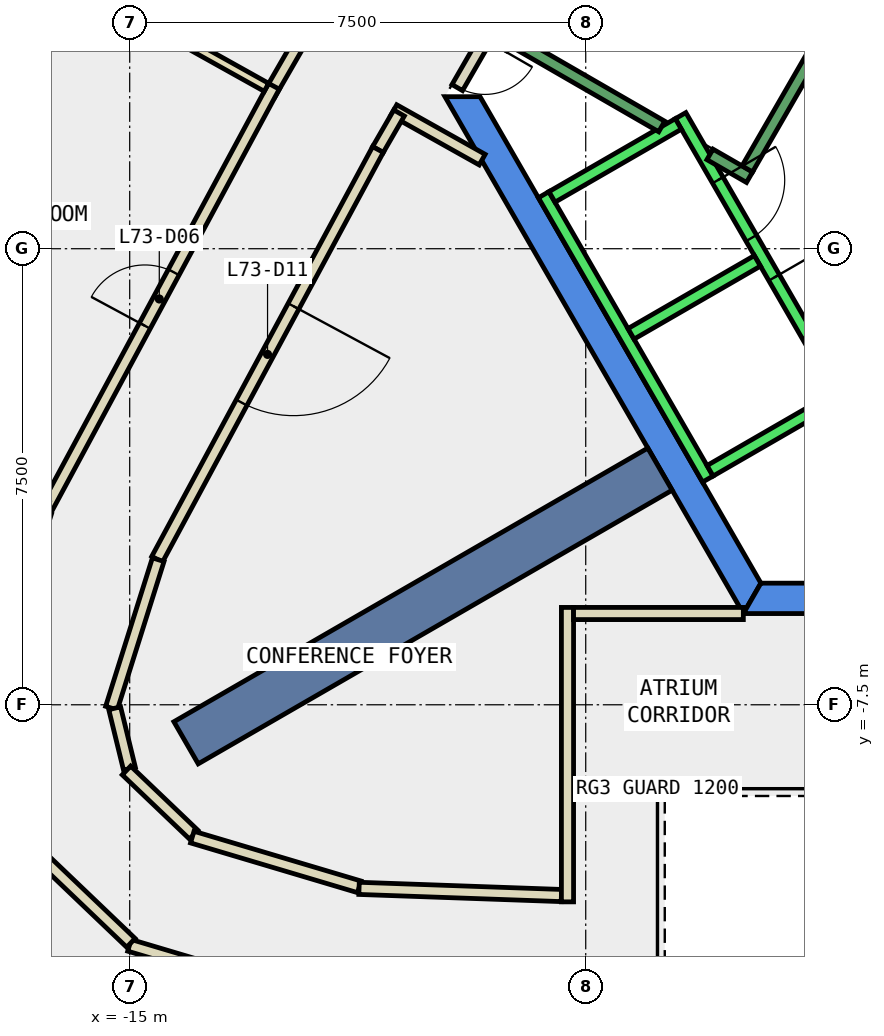
"""IFC4 building model, lengths in metres.
Left out: names, types, materials, properties, quantities, classifications, styles, units other than length and angle.
Written with IfcOpenShell. Run it as: python <this file> out.ifc"""

import sys

from ifc_helpers import new_model, si_unit, direction, frame, frame_2d, origin, place, context, subcontext, project, spatial, polyline, rectangle, outline, extrude, element, fill, save


model = new_model("IFC4")
c1 = context("Model", 3, precision=1e-05, world=origin(), true_north=direction((0.0, 1.0)))
c2 = subcontext(c1, "Body", "Model", "MODEL_VIEW")
j1 = project(units=[si_unit("LENGTHUNIT", "METRE"), si_unit("PLANEANGLEUNIT", "RADIAN")], contexts=[c1])
p1 = place(None, origin())
s1 = spatial("IfcSite", under=j1, at=p1, CompositionType="ELEMENT")
p2 = place(p1, origin())
s2 = spatial("IfcBuilding", under=s1, at=p2, CompositionType="ELEMENT")
p3 = place(p2, frame((0.0, 0.0, 311.6)))
s3 = spatial("IfcBuildingStorey", under=s2, at=p3, CompositionType="ELEMENT", Elevation=311.6)
p4 = place(p3, frame((0.0, 0.0, -0.34)))
e1 = element("IfcWall", 1, at=p4, inside=s3, PredefinedType="SHEAR", context=c2, shape_type="SweptSolid", body=[
    extrude(outline(polyline([(-9.815, 2.5), (-4.907, -6.0), (-4.619, -5.5), (-9.238, 2.5), (-9.815, 2.5)])), origin(), (0.0, 0.0, 1.0), 3.6),
])
p5 = place(p3, frame((0.0, 0.0, -0.34)))
e2 = element("IfcWall", 2, at=p5, inside=s3, PredefinedType="SHEAR", context=c2, shape_type="SweptSolid", body=[
    extrude(outline(polyline([(3.75, -6.0), (3.75, -5.5), (-4.619, -5.5), (-4.907, -6.0), (3.75, -6.0)])), origin(), (0.0, 0.0, 1.0), 3.6),
])
p6 = place(p3, frame((-6.279, -3.625, -0.34), z_axis=(0.0, 0.0, 1.0), x_axis=(-0.866017533419, -0.500013631625, 0.0)))
e3 = element("IfcWall", 3, at=p6, inside=s3, PredefinedType="SHEAR", context=c2, shape_type="SweptSolid", body=[
    extrude(rectangle(XDim=9.0, YDim=0.8, at=frame_2d((4.5, 0.0))), origin(), (0.0, 0.0, 1.0), 3.6),
])
p7 = place(p3, frame((-9.203, 1.465, 0.0), z_axis=(0.0, 0.0, 1.0), x_axis=(-0.872341127106, 0.488897696823, 0.0)))
e4 = element("IfcWall", 4, at=p7, inside=s3, PredefinedType="PARTITIONING", context=c2, shape_type="SweptSolid", body=[
    extrude(rectangle(XDim=1.667, YDim=0.2, at=frame_2d((0.833, 0.0))), origin(), (0.0, 0.0, 1.0), 3.26),
])
p8 = place(p3, frame((-10.57, 2.232, 0.0), z_axis=(0.0, 0.0, 1.0), x_axis=(-0.500037208726, -0.86600392025, 0.0)))
e5 = element("IfcWall", 5, at=p8, inside=s3, PredefinedType="PARTITIONING", context=c2, shape_type="SweptSolid", body=[
    extrude(rectangle(XDim=0.694, YDim=0.2, at=frame_2d((0.347, 0.0))), origin(), (0.0, 0.0, 1.0), 3.26),
])
p9 = place(p3, frame((-10.917, 1.631, 0.0), z_axis=(0.0, 0.0, 1.0), x_axis=(-0.47449538478, -0.880257990491, 0.0)))
e6 = element("IfcWall", 6, at=p9, inside=s3, PredefinedType="PARTITIONING", context=c2, shape_type="SweptSolid", body=[
    extrude(rectangle(XDim=7.655, YDim=0.2, at=frame_2d((3.827, 0.0))), origin(), (0.0, 0.0, 1.0), 3.26),
])
p10 = place(p9, frame((2.927, 0.0, 0.0)))
e7 = element("IfcOpeningElement", 7, at=p10, cuts=e6, PredefinedType="OPENING", context=c2, shape_type="SweptSolid", body=[
    extrude(rectangle(XDim=1.8, YDim=2.1, at=frame_2d((0.9, 1.05))), frame((0.0, 0.11, 0.0), z_axis=(0.0, -1.0, 0.0), x_axis=(1.0, 0.0, 0.0)), (0.0, 0.0, 1.0), 0.22),
])
p11 = place(p3, frame((-14.531, -5.114, 0.0), z_axis=(0.0, 0.0, 1.0), x_axis=(-0.300501248013, -0.953781421471, 0.0)))
e8 = element("IfcWall", 8, at=p11, inside=s3, PredefinedType="PARTITIONING", context=c2, shape_type="SweptSolid", body=[
    extrude(rectangle(XDim=2.559, YDim=0.2, at=frame_2d((1.28, 0.0))), origin(), (0.0, 0.0, 1.0), 3.26),
])
p12 = place(p3, frame((-15.247, -7.557, 0.0), z_axis=(0.0, 0.0, 1.0), x_axis=(0.237373129266, -0.971418549083, 0.0)))
e9 = element("IfcWall", 9, at=p12, inside=s3, PredefinedType="PARTITIONING", context=c2, shape_type="SweptSolid", body=[
    extrude(rectangle(XDim=1.024, YDim=0.2, at=frame_2d((0.512, 0.0))), origin(), (0.0, 0.0, 1.0), 3.26),
])
p13 = place(p3, frame((-15.053, -8.58, 0.0), z_axis=(0.0, 0.0, 1.0), x_axis=(0.723283043556, -0.690551691696, 0.0)))
e10 = element("IfcWall", 10, at=p13, inside=s3, PredefinedType="PARTITIONING", context=c2, shape_type="SweptSolid", body=[
    extrude(rectangle(XDim=1.529, YDim=0.2, at=frame_2d((0.765, 0.0))), origin(), (0.0, 0.0, 1.0), 3.26),
])
p14 = place(p3, frame((-13.971, -9.676, 0.0), z_axis=(0.0, 0.0, 1.0), x_axis=(0.958417413979, -0.285370041492, 0.0)))
e11 = element("IfcWall", 11, at=p14, inside=s3, PredefinedType="PARTITIONING", context=c2, shape_type="SweptSolid", body=[
    extrude(rectangle(XDim=2.866, YDim=0.2, at=frame_2d((1.433, 0.0))), origin(), (0.0, 0.0, 1.0), 3.26),
])
p15 = place(p3, frame((-11.228, -10.519, 0.0), z_axis=(0.0, 0.0, 1.0), x_axis=(0.999372900517, -0.035409119054, 0.0)))
e12 = element("IfcWall", 12, at=p15, inside=s3, PredefinedType="PARTITIONING", context=c2, shape_type="SweptSolid", body=[
    extrude(rectangle(XDim=3.33, YDim=0.2, at=frame_2d((1.665, 0.0))), origin(), (0.0, 0.0, 1.0), 3.26),
])
p16 = place(p3, frame((-12.701, 2.54, 0.0), z_axis=(0.0, 0.0, 1.0), x_axis=(0.499946799636, 0.86605611685, 0.0)))
e13 = element("IfcWall", 13, at=p16, inside=s3, PredefinedType="PARTITIONING", context=c2, shape_type="SweptSolid", body=[
    extrude(rectangle(XDim=8.227, YDim=0.2, at=frame_2d((4.114, 0.0))), origin(), (0.0, 0.0, 1.0), 3.26),
])
p17 = place(p16, frame((3.613, 0.0, 0.0)))
e14 = element("IfcOpeningElement", 14, at=p17, cuts=e13, PredefinedType="OPENING", context=c2, shape_type="SweptSolid", body=[
    extrude(rectangle(XDim=1.0, YDim=2.1, at=frame_2d((0.5, 1.05))), frame((0.0, 0.11, 0.0), z_axis=(0.0, -1.0, 0.0), x_axis=(1.0, 0.0, 0.0)), (0.0, 0.0, 1.0), 0.22),
])
p18 = place(p3, frame((-16.399, -4.325, 0.0), z_axis=(0.0, 0.0, 1.0), x_axis=(0.474489967676, 0.880260910512, 0.0)))
e15 = element("IfcWall", 15, at=p18, inside=s3, PredefinedType="PARTITIONING", context=c2, shape_type="SweptSolid", body=[
    extrude(rectangle(XDim=7.948, YDim=0.2, at=frame_2d((3.974, 0.0))), origin(), (0.0, 0.0, 1.0), 3.26),
])
p19 = place(p18, frame((3.474, 0.0, 0.0)))
e16 = element("IfcOpeningElement", 16, at=p19, cuts=e15, PredefinedType="OPENING", context=c2, shape_type="SweptSolid", body=[
    extrude(rectangle(XDim=1.0, YDim=2.1, at=frame_2d((0.5, 1.05))), frame((0.0, 0.11, 0.0), z_axis=(0.0, -1.0, 0.0), x_axis=(1.0, 0.0, 0.0)), (0.0, 0.0, 1.0), 0.22),
])
p20 = place(p3, frame((-11.55, -12.484, 0.0), z_axis=(0.0, 0.0, 1.0), x_axis=(-0.958459796003, 0.285227662485, 0.0)))
e17 = element("IfcWall", 17, at=p20, inside=s3, PredefinedType="PARTITIONING", context=c2, shape_type="SweptSolid", body=[
    extrude(rectangle(XDim=3.604, YDim=0.2, at=frame_2d((1.802, 0.0))), origin(), (0.0, 0.0, 1.0), 3.26),
])
p21 = place(p3, frame((-14.98, -11.415, 0.0), z_axis=(0.0, 0.0, 1.0), x_axis=(-0.723099256445, 0.690744138831, 0.0)))
e18 = element("IfcWall", 18, at=p21, inside=s3, PredefinedType="PARTITIONING", context=c2, shape_type="SweptSolid", body=[
    extrude(rectangle(XDim=2.596, YDim=0.2, at=frame_2d((1.298, 0.0))), origin(), (0.0, 0.0, 1.0), 3.26),
])
p22 = place(p3, frame((-7.8, -10.741, 0.0), z_axis=(0.0, 0.0, 1.0), x_axis=(0.0, 1.0, 0.0)))
e19 = element("IfcWall", 19, at=p22, inside=s3, PredefinedType="PARTITIONING", context=c2, shape_type="SweptSolid", body=[
    extrude(rectangle(XDim=4.842, YDim=0.2, at=frame_2d((2.421, 0.0))), origin(), (0.0, 0.0, 1.0), 3.26),
])
p23 = place(p3, frame((-7.7, -5.999, 0.0), z_axis=(0.0, 0.0, 1.0), x_axis=(1.0, 0.0, 0.0)))
e20 = element("IfcWall", 20, at=p23, inside=s3, PredefinedType="PARTITIONING", context=c2, shape_type="SweptSolid", body=[
    extrude(rectangle(XDim=2.792, YDim=0.2, at=frame_2d((1.396, 0.0))), origin(), (0.0, 0.0, 1.0), 3.26),
])
p24 = place(p3, frame((-12.751, 2.654, 0.0), z_axis=(0.0, 0.0, 1.0), x_axis=(-0.873277679945, 0.487222837837, 0.0)))
e21 = element("IfcWall", 21, at=p24, inside=s3, PredefinedType="PARTITIONING", context=c2, shape_type="SweptSolid", body=[
    extrude(rectangle(XDim=4.38, YDim=0.15, at=frame_2d((2.19, 0.0))), origin(), (0.0, 0.0, 1.0), 3.26),
])
p25 = place(p3, frame((-9.15, 3.452, 0.0), z_axis=(0.0, 0.0, 1.0), x_axis=(-0.500079945886, -0.865979242085, 0.0)))
e22 = element("IfcWall", 22, at=p25, inside=s3, PredefinedType="PARTITIONING", context=c2, shape_type="SweptSolid", body=[
    extrude(rectangle(XDim=0.926, YDim=0.2, at=frame_2d((0.463, 0.0))), origin(), (0.0, 0.0, 1.0), 2.4),
])
p26 = place(p25, frame((0.017, 0.0, 0.0)))
e23 = element("IfcOpeningElement", 23, at=p26, cuts=e22, PredefinedType="OPENING", context=c2, shape_type="SweptSolid", body=[
    extrude(rectangle(XDim=0.9, YDim=2.1, at=frame_2d((0.45, 1.05))), frame((0.0, 0.11, 0.0), z_axis=(0.0, -1.0, 0.0), x_axis=(1.0, 0.0, 0.0)), (0.0, 0.0, 1.0), 0.22),
])
p27 = place(p3, frame((-5.94, 2.188, 0.0), z_axis=(0.0, 0.0, 1.0), x_axis=(0.500034260056, -0.866005622828, 0.0)))
e24 = element("IfcWall", 24, at=p27, inside=s3, PredefinedType="STANDARD", context=c2, shape_type="SweptSolid", body=[
    extrude(rectangle(XDim=5.399, YDim=0.2, at=frame_2d((2.7, 0.0))), origin(), (0.0, 0.0, 1.0), 3.26),
])
p28 = place(p27, frame((3.075, 0.0, 0.0)))
e25 = element("IfcOpeningElement", 25, at=p28, cuts=e24, PredefinedType="OPENING", context=c2, shape_type="SweptSolid", body=[
    extrude(rectangle(XDim=1.1, YDim=2.1, at=frame_2d((0.55, 1.05))), frame((0.0, 0.11, 0.0), z_axis=(0.0, -1.0, 0.0), x_axis=(1.0, 0.0, 0.0)), (0.0, 0.0, 1.0), 0.22),
])
p29 = place(p27, frame((1.225, 0.0, 0.0)))
e26 = element("IfcOpeningElement", 26, at=p29, cuts=e24, PredefinedType="OPENING", context=c2, shape_type="SweptSolid", body=[
    extrude(rectangle(XDim=1.1, YDim=2.1, at=frame_2d((0.55, 1.05))), frame((0.0, 0.11, 0.0), z_axis=(0.0, -1.0, 0.0), x_axis=(1.0, 0.0, 0.0)), (0.0, 0.0, 1.0), 0.22),
])
p30 = place(p3, frame((-8.192, 0.888, 0.0), z_axis=(0.0, 0.0, 1.0), x_axis=(0.500034260056, -0.866005622828, 0.0)))
e27 = element("IfcWall", 27, at=p30, inside=s3, PredefinedType="STANDARD", context=c2, shape_type="SweptSolid", body=[
    extrude(rectangle(XDim=5.399, YDim=0.2, at=frame_2d((2.7, 0.0))), origin(), (0.0, 0.0, 1.0), 3.26),
])
for number, where, z_axis, x_axis in (
    (28, (-5.977, 2.052, 0.0), (0.0, 0.0, 1.0), (-0.866, -0.5, 0.0)),
    (29, (-4.677, -0.2, 0.0), (0.0, 0.0, 1.0), (-0.866, -0.5, 0.0)),
):
    element("IfcWall", number, at=place(p3, frame(where, z_axis=z_axis, x_axis=x_axis)), inside=s3, PredefinedType="STANDARD", context=c2, shape_type="SweptSolid", body=[
        extrude(rectangle(XDim=2.399, YDim=0.2, at=frame_2d((1.2, 0.0))), origin(), (0.0, 0.0, 1.0), 3.26),
    ])
p31 = place(p3, frame((-3.377, -2.452, 0.0), z_axis=(0.0, 0.0, 1.0), x_axis=(-0.865955154139, -0.50012165622, 0.0)))
e30 = element("IfcWall", 30, at=p31, inside=s3, PredefinedType="STANDARD", context=c2, shape_type="SweptSolid", body=[
    extrude(rectangle(XDim=2.4, YDim=0.2, at=frame_2d((1.2, 0.0))), origin(), (0.0, 0.0, 1.0), 3.26),
])
p32 = place(p3, frame((-6.25, 2.01, 0.0), z_axis=(0.0, 0.0, 1.0), x_axis=(-0.86611865017, 0.499838457731, 0.0)))
e31 = element("IfcWall", 31, at=p32, inside=s3, PredefinedType="STANDARD", context=c2, shape_type="SweptSolid", body=[
    extrude(rectangle(XDim=2.733, YDim=0.2, at=frame_2d((1.366, 0.0))), origin(), (0.0, 0.0, 1.0), 3.26),
])
p33 = place(p3, frame((-4.806, 1.176, 0.0), z_axis=(0.0, 0.0, 1.0), x_axis=(-0.866558586415, 0.499075361355, 0.0)))
e32 = element("IfcWall", 32, at=p33, inside=s3, PredefinedType="STANDARD", context=c2, shape_type="SweptSolid", body=[
    extrude(rectangle(XDim=0.751, YDim=0.2, at=frame_2d((0.376, 0.0))), origin(), (0.0, 0.0, 1.0), 3.26),
])
p34 = place(p3, frame((-1.393, 7.288, 0.0), z_axis=(0.0, 0.0, 1.0), x_axis=(-0.499963383562, -0.866046543262, 0.0)))
e33 = element("IfcWall", 33, at=p34, inside=s3, PredefinedType="STANDARD", context=c2, shape_type="SweptSolid", body=[
    extrude(rectangle(XDim=6.9, YDim=0.2, at=frame_2d((3.45, 0.0))), origin(), (0.0, 0.0, 1.0), 3.26),
])
p35 = place(p34, frame((0.45, 0.0, 0.0)))
e34 = element("IfcOpeningElement", 34, at=p35, cuts=e33, PredefinedType="OPENING", context=c2, shape_type="SweptSolid", body=[
    extrude(rectangle(XDim=1.1, YDim=2.2, at=frame_2d((0.55, 1.1))), frame((0.0, 0.11, 0.0), z_axis=(0.0, -1.0, 0.0), x_axis=(1.0, 0.0, 0.0)), (0.0, 0.0, 1.0), 0.22),
])
p36 = place(p19, origin())
e35 = element("IfcDoor", 35, at=p36, inside=s3, OperationType="SINGLE_SWING_LEFT", PredefinedType="DOOR", context=c2, shape_type="SweptSolid", body=[
    extrude(rectangle(XDim=1.0, YDim=2.1, at=frame_2d((0.5, 1.05))), frame((0.0, 0.025, 0.0), z_axis=(0.0, -1.0, 0.0), x_axis=(1.0, 0.0, 0.0)), (0.0, 0.0, 1.0), 0.05),
])
fill(e16, e35)
p37 = place(p10, origin())
e36 = element("IfcDoor", 36, at=p37, inside=s3, OperationType="DOUBLE_DOOR_SINGLE_SWING", PredefinedType="DOOR", context=c2, shape_type="SweptSolid", body=[
    extrude(rectangle(XDim=1.8, YDim=2.1, at=frame_2d((0.9, 1.05))), frame((0.0, 0.025, 0.0), z_axis=(0.0, -1.0, 0.0), x_axis=(1.0, 0.0, 0.0)), (0.0, 0.0, 1.0), 0.05),
])
fill(e7, e36)
p38 = place(p26, origin())
e37 = element("IfcDoor", 37, at=p38, inside=s3, OperationType="SINGLE_SWING_LEFT", PredefinedType="DOOR", context=c2, shape_type="SweptSolid", body=[
    extrude(rectangle(XDim=0.9, YDim=2.1, at=frame_2d((0.45, 1.05))), frame((0.0, 0.025, 0.0), z_axis=(0.0, -1.0, 0.0), x_axis=(1.0, 0.0, 0.0)), (0.0, 0.0, 1.0), 0.05),
])
fill(e23, e37)
p39 = place(p28, origin())
e38 = element("IfcDoor", 38, at=p39, inside=s3, OperationType="SLIDING_TO_LEFT", PredefinedType="DOOR", context=c2, shape_type="SweptSolid", body=[
    extrude(rectangle(XDim=1.1, YDim=2.1, at=frame_2d((0.55, 1.05))), frame((0.0, 0.025, 0.0), z_axis=(0.0, -1.0, 0.0), x_axis=(1.0, 0.0, 0.0)), (0.0, 0.0, 1.0), 0.05),
])
fill(e25, e38)
p40 = place(p29, origin())
e39 = element("IfcDoor", 39, at=p40, inside=s3, OperationType="SLIDING_TO_LEFT", PredefinedType="DOOR", context=c2, shape_type="SweptSolid", body=[
    extrude(rectangle(XDim=1.1, YDim=2.1, at=frame_2d((0.55, 1.05))), frame((0.0, 0.025, 0.0), z_axis=(0.0, -1.0, 0.0), x_axis=(1.0, 0.0, 0.0)), (0.0, 0.0, 1.0), 0.05),
])
fill(e26, e39)
save(model, sys.argv[1])
